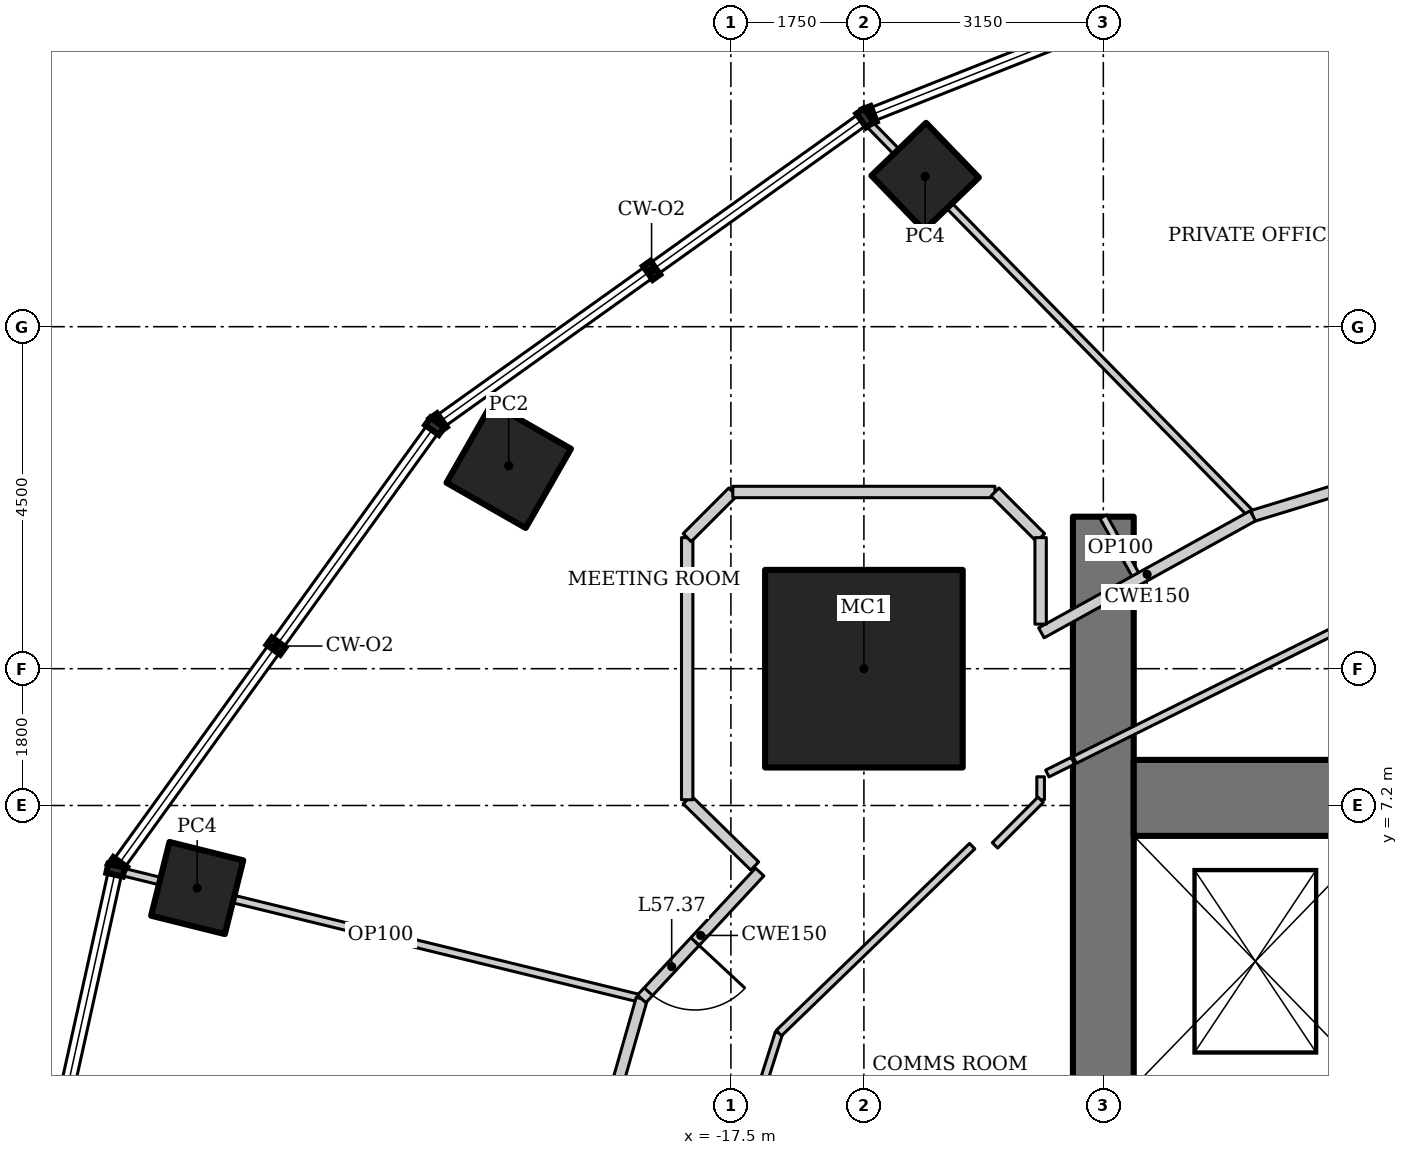
"""IFC4 building model, lengths in metres.
Left out: names, types, materials, properties, quantities, classifications, styles, units other than length and angle.
Written with IfcOpenShell. Run it as: python <this file> out.ifc"""

import sys

from ifc_helpers import new_model, si_unit, direction, frame, frame_2d, origin, origin_2d, place, context, subcontext, project, spatial, rectangle, hollow_rectangle, extrude, element, fill, save


model = new_model("IFC4")
c1 = context("Model", 3, precision=1e-05, world=origin(), true_north=direction((0.0, 1.0)))
c2 = subcontext(c1, "Body", "Model", "MODEL_VIEW")
j1 = project(units=[si_unit("LENGTHUNIT", "METRE"), si_unit("PLANEANGLEUNIT", "RADIAN")], contexts=[c1])
p1 = place(None, origin())
s1 = spatial("IfcSite", under=j1, at=p1, CompositionType="ELEMENT")
p2 = place(p1, origin())
s2 = spatial("IfcBuilding", under=s1, at=p2, CompositionType="ELEMENT")
p3 = place(p2, frame((0.0, 0.0, 245.2)))
s3 = spatial("IfcBuildingStorey", under=s2, at=p3, CompositionType="ELEMENT", Elevation=245.2)
p4 = place(p3, frame((-15.75, 9.0, 0.0), z_axis=(0.0, 0.0, 1.0), x_axis=(1.0, 0.0, 0.0)))
e1 = element("IfcColumn", 1, at=p4, inside=s3, PredefinedType="COLUMN", context=c2, shape_type="SweptSolid", body=[
    extrude(hollow_rectangle(XDim=2.6, YDim=2.6, WallThickness=0.13, at=origin_2d()), origin(), (0.0, 0.0, 1.0), 4.2),
])
for number, where, z_axis, x_axis in (
    (2, (-9.035, 17.731, 0.0), (0.0, 0.0, 1.0), (0.891, 0.454, 0.0)),
    (3, (-14.944, 15.475, 0.0), (0.0, 0.0, 1.0), (0.719, 0.695, 0.0)),
):
    element("IfcColumn", number, at=place(p3, frame(where, z_axis=z_axis, x_axis=x_axis)), inside=s3, PredefinedType="COLUMN", context=c2, shape_type="SweptSolid", body=[
        extrude(hollow_rectangle(XDim=1.0, YDim=1.0, WallThickness=0.08, at=origin_2d()), origin(), (0.0, 0.0, 1.0), 4.2),
    ])
p5 = place(p3, frame((-20.423, 11.67, 0.0), z_axis=(0.0, 0.0, 1.0), x_axis=(0.496139221777, 0.86824298017, 0.0)))
e4 = element("IfcColumn", 4, at=p5, inside=s3, PredefinedType="COLUMN", context=c2, shape_type="SweptSolid", body=[
    extrude(hollow_rectangle(XDim=1.2, YDim=1.2, WallThickness=0.1, at=origin_2d()), origin(), (0.0, 0.0, 1.0), 4.2),
])
p6 = place(p3, frame((-24.522, 6.114, 0.0), z_axis=(0.0, 0.0, 1.0), x_axis=(0.2419218956, 0.970295726276, 0.0)))
e5 = element("IfcColumn", 5, at=p6, inside=s3, PredefinedType="COLUMN", context=c2, shape_type="SweptSolid", body=[
    extrude(hollow_rectangle(XDim=1.0, YDim=1.0, WallThickness=0.08, at=origin_2d()), origin(), (0.0, 0.0, 1.0), 4.2),
])
p7 = place(p3, frame((-12.6, 11.0, 0.0), z_axis=(0.0, 0.0, 1.0), x_axis=(0.0, -1.0, 0.0)))
e6 = element("IfcWall", 6, at=p7, inside=s3, PredefinedType="SHEAR", context=c2, shape_type="SweptSolid", body=[
    extrude(rectangle(XDim=22.0, YDim=0.8, at=frame_2d((11.0, 0.0))), origin(), (0.0, 0.0, 1.0), 4.2),
])
p8 = place(p7, frame((10.1, 0.0, 0.0)))
e7 = element("IfcOpeningElement", 7, at=p8, cuts=e6, PredefinedType="OPENING", context=c2, shape_type="SweptSolid", body=[
    extrude(rectangle(XDim=1.8, YDim=2.1, at=frame_2d((0.9, 1.05))), frame((0.0, 0.41, 0.0), z_axis=(0.0, -1.0, 0.0), x_axis=(1.0, 0.0, 0.0)), (0.0, 0.0, 1.0), 0.82),
])
p9 = place(p3, frame((-5.6, 7.3, 0.0), z_axis=(0.0, 0.0, 1.0), x_axis=(-1.0, 0.0, 0.0)))
e8 = element("IfcWall", 8, at=p9, inside=s3, PredefinedType="SHEAR", context=c2, shape_type="SweptSolid", body=[
    extrude(rectangle(XDim=6.6, YDim=1.0, at=frame_2d((3.3, 0.0))), origin(), (0.0, 0.0, 1.0), 4.2),
])
p10 = place(p3, frame((-15.709, 16.199, 0.0), z_axis=(0.0, 0.0, 1.0), x_axis=(0.699362525935, -0.714767135029, 0.0)))
e9 = element("IfcWall", 9, at=p10, inside=s3, PredefinedType="PARTITIONING", context=c2, shape_type="SweptSolid", body=[
    extrude(rectangle(XDim=7.259, YDim=0.1, at=frame_2d((3.629, 0.0))), origin(), (0.0, 0.0, 1.0), 3.41),
])
p11 = place(p3, frame((-25.543, 6.335, 0.0), z_axis=(0.0, 0.0, 1.0), x_axis=(0.971384494438, -0.237512450129, 0.0)))
e10 = element("IfcWall", 10, at=p11, inside=s3, PredefinedType="PARTITIONING", context=c2, shape_type="SweptSolid", body=[
    extrude(rectangle(XDim=7.072, YDim=0.1, at=frame_2d((3.536, 0.0))), origin(), (0.0, 0.0, 1.0), 3.108),
])
p12 = place(p3, frame((-6.288, 12.341, 0.0), z_axis=(0.0, 0.0, 1.0), x_axis=(-0.956185837153, -0.292760388079, 0.0)))
e11 = element("IfcWall", 11, at=p12, inside=s3, PredefinedType="PARTITIONING", context=c2, shape_type="SweptSolid", body=[
    extrude(rectangle(XDim=4.544, YDim=0.15, at=frame_2d((2.272, 0.0))), origin(), (0.0, 0.0, 1.0), 4.05),
])
p13 = place(p12, frame((0.15, 0.0, 0.0)))
e12 = element("IfcOpeningElement", 12, at=p13, cuts=e11, PredefinedType="OPENING", context=c2, shape_type="SweptSolid", body=[
    extrude(rectangle(XDim=0.9, YDim=2.1, at=frame_2d((0.45, 1.05))), frame((0.0, 0.085, 0.0), z_axis=(0.0, -1.0, 0.0), x_axis=(1.0, 0.0, 0.0)), (0.0, 0.0, 1.0), 0.17),
])
p14 = place(p3, frame((-12.977, 7.8, 0.0), z_axis=(0.0, 0.0, 1.0), x_axis=(0.895529831139, 0.445001484874, 0.0)))
e13 = element("IfcWall", 13, at=p14, inside=s3, PredefinedType="PARTITIONING", context=c2, shape_type="SweptSolid", body=[
    extrude(rectangle(XDim=4.108, YDim=0.1, at=frame_2d((2.054, 0.0))), origin(), (0.0, 0.0, 1.0), 4.05),
])
p15 = place(p3, frame((-13.337, 7.621, 0.0), z_axis=(0.0, 0.0, 1.0), x_axis=(0.895721570004, 0.444615416995, 0.0)))
e14 = element("IfcWall", 14, at=p15, inside=s3, PredefinedType="PARTITIONING", context=c2, shape_type="SweptSolid", body=[
    extrude(rectangle(XDim=0.376, YDim=0.1, at=frame_2d((0.188, 0.0))), origin(), (0.0, 0.0, 1.0), 4.05),
])
p16 = place(p3, frame((-12.6, 11.0, 0.0), z_axis=(0.0, 0.0, 1.0), x_axis=(0.484103558985, -0.875010710893, 0.0)))
e15 = element("IfcWall", 15, at=p16, inside=s3, PredefinedType="PARTITIONING", context=c2, shape_type="SweptSolid", body=[
    extrude(rectangle(XDim=0.943, YDim=0.1, at=frame_2d((0.472, 0.0))), origin(), (0.0, 0.0, 1.0), 4.05),
])
p17 = place(p3, frame((-18.673, 4.656, 0.0), z_axis=(0.0, 0.0, 1.0), x_axis=(-0.274067949327, -0.961710330168, 0.0)))
e16 = element("IfcWall", 16, at=p17, inside=s3, PredefinedType="PARTITIONING", context=c2, shape_type="SweptSolid", body=[
    extrude(rectangle(XDim=2.567, YDim=0.15, at=frame_2d((1.284, 0.0))), origin(), (0.0, 0.0, 1.0), 4.05),
])
p18 = place(p3, frame((-17.46, 2.335, 0.0), z_axis=(0.0, 0.0, 1.0), x_axis=(0.301821975729, 0.953364303384, 0.0)))
e17 = element("IfcWall", 17, at=p18, inside=s3, PredefinedType="PARTITIONING", context=c2, shape_type="SweptSolid", body=[
    extrude(rectangle(XDim=1.962, YDim=0.1, at=frame_2d((0.981, 0.0))), origin(), (0.0, 0.0, 1.0), 4.05),
])
p19 = place(p3, frame((-10.633, 11.01, 0.0), z_axis=(0.0, 0.0, 1.0), x_axis=(-0.875072100837, -0.483992580869, 0.0)))
e18 = element("IfcWall", 18, at=p19, inside=s3, PredefinedType="PARTITIONING", context=c2, shape_type="SweptSolid", body=[
    extrude(rectangle(XDim=3.179, YDim=0.15, at=frame_2d((1.59, 0.0))), origin(), (0.0, 0.0, 1.0), 4.05),
])
p20 = place(p3, frame((-17.121, 6.325, 0.0), z_axis=(0.0, 0.0, 1.0), x_axis=(-0.680985069419, -0.732297299755, 0.0)))
e19 = element("IfcWall", 19, at=p20, inside=s3, PredefinedType="PARTITIONING", context=c2, shape_type="SweptSolid", body=[
    extrude(rectangle(XDim=2.279, YDim=0.15, at=frame_2d((1.14, 0.0))), origin(), (0.0, 0.0, 1.0), 4.05),
])
p21 = place(p20, frame((1.25, 0.0, 0.0)))
e20 = element("IfcOpeningElement", 20, at=p21, cuts=e19, PredefinedType="OPENING", context=c2, shape_type="SweptSolid", body=[
    extrude(rectangle(XDim=0.9, YDim=2.1, at=frame_2d((0.45, 1.05))), frame((0.0, 0.085, 0.0), z_axis=(0.0, -1.0, 0.0), x_axis=(1.0, 0.0, 0.0)), (0.0, 0.0, 1.0), 0.17),
])
p22 = place(p3, frame((-16.868, 4.206, 0.0), z_axis=(0.0, 0.0, 1.0), x_axis=(0.718810161381, 0.695206409562, 0.0)))
e21 = element("IfcWall", 21, at=p22, inside=s3, PredefinedType="PARTITIONING", context=c2, shape_type="SweptSolid", body=[
    extrude(rectangle(XDim=3.537, YDim=0.1, at=frame_2d((1.769, 0.0))), origin(), (0.0, 0.0, 1.0), 4.05),
])
p23 = place(p3, frame((-13.425, 7.578, 0.0), z_axis=(0.0, 0.0, 1.0), x_axis=(0.0, -1.0, 0.0)))
e22 = element("IfcWall", 22, at=p23, inside=s3, PredefinedType="PARTITIONING", context=c2, shape_type="SweptSolid", body=[
    extrude(rectangle(XDim=0.302, YDim=0.1, at=frame_2d((0.151, 0.0))), origin(), (0.0, 0.0, 1.0), 4.05),
])
p24 = place(p3, frame((-13.425, 7.275, 0.0), z_axis=(0.0, 0.0, 1.0), x_axis=(-0.707106781187, -0.707106781187, 0.0)))
e23 = element("IfcWall", 23, at=p24, inside=s3, PredefinedType="PARTITIONING", context=c2, shape_type="SweptSolid", body=[
    extrude(rectangle(XDim=0.849, YDim=0.1, at=frame_2d((0.425, 0.0))), origin(), (0.0, 0.0, 1.0), 4.05),
])
p25 = place(p3, frame((-17.187, 6.404, 0.0), z_axis=(0.0, 0.0, 1.0), x_axis=(-0.713842064016, 0.700306723973, 0.0)))
e24 = element("IfcWall", 24, at=p25, inside=s3, PredefinedType="PARTITIONING", context=c2, shape_type="SweptSolid", body=[
    extrude(rectangle(XDim=1.245, YDim=0.15, at=frame_2d((0.622, 0.0))), origin(), (0.0, 0.0, 1.0), 4.05),
])
p26 = place(p3, frame((-18.075, 7.275, 0.0), z_axis=(0.0, 0.0, 1.0), x_axis=(0.0, 1.0, 0.0)))
e25 = element("IfcWall", 25, at=p26, inside=s3, PredefinedType="PARTITIONING", context=c2, shape_type="SweptSolid", body=[
    extrude(rectangle(XDim=3.449, YDim=0.15, at=frame_2d((1.725, 0.0))), origin(), (0.0, 0.0, 1.0), 3.601),
])
p27 = place(p3, frame((-18.075, 10.725, 0.0), z_axis=(0.0, 0.0, 1.0), x_axis=(0.707106781187, 0.707106781187, 0.0)))
e26 = element("IfcWall", 26, at=p27, inside=s3, PredefinedType="PARTITIONING", context=c2, shape_type="SweptSolid", body=[
    extrude(rectangle(XDim=0.849, YDim=0.15, at=frame_2d((0.425, 0.0))), origin(), (0.0, 0.0, 1.0), 4.05),
])
p28 = place(p3, frame((-17.475, 11.325, 0.0), z_axis=(0.0, 0.0, 1.0), x_axis=(1.0, 0.0, 0.0)))
e27 = element("IfcWall", 27, at=p28, inside=s3, PredefinedType="PARTITIONING", context=c2, shape_type="SweptSolid", body=[
    extrude(rectangle(XDim=3.449, YDim=0.15, at=frame_2d((1.725, 0.0))), origin(), (0.0, 0.0, 1.0), 4.05),
])
p29 = place(p3, frame((-14.025, 11.325, 0.0), z_axis=(0.0, 0.0, 1.0), x_axis=(0.707106781187, -0.707106781187, 0.0)))
e28 = element("IfcWall", 28, at=p29, inside=s3, PredefinedType="PARTITIONING", context=c2, shape_type="SweptSolid", body=[
    extrude(rectangle(XDim=0.849, YDim=0.15, at=frame_2d((0.425, 0.0))), origin(), (0.0, 0.0, 1.0), 4.05),
])
p30 = place(p3, frame((-13.425, 10.725, 0.0), z_axis=(0.0, 0.0, 1.0), x_axis=(0.0, -1.0, 0.0)))
e29 = element("IfcWall", 29, at=p30, inside=s3, PredefinedType="PARTITIONING", context=c2, shape_type="SweptSolid", body=[
    extrude(rectangle(XDim=1.138, YDim=0.15, at=frame_2d((0.569, 0.0))), origin(), (0.0, 0.0, 1.0), 4.05),
])
p31 = place(p21, origin())
e30 = element("IfcDoor", 30, at=p31, inside=s3, OperationType="SINGLE_SWING_LEFT", PredefinedType="DOOR", context=c2, shape_type="SweptSolid", body=[
    extrude(rectangle(XDim=0.9, YDim=2.1, at=frame_2d((0.45, 1.05))), frame((0.0, 0.025, 0.0), z_axis=(0.0, -1.0, 0.0), x_axis=(1.0, 0.0, 0.0)), (0.0, 0.0, 1.0), 0.05),
])
fill(e20, e30)
save(model, sys.argv[1])
